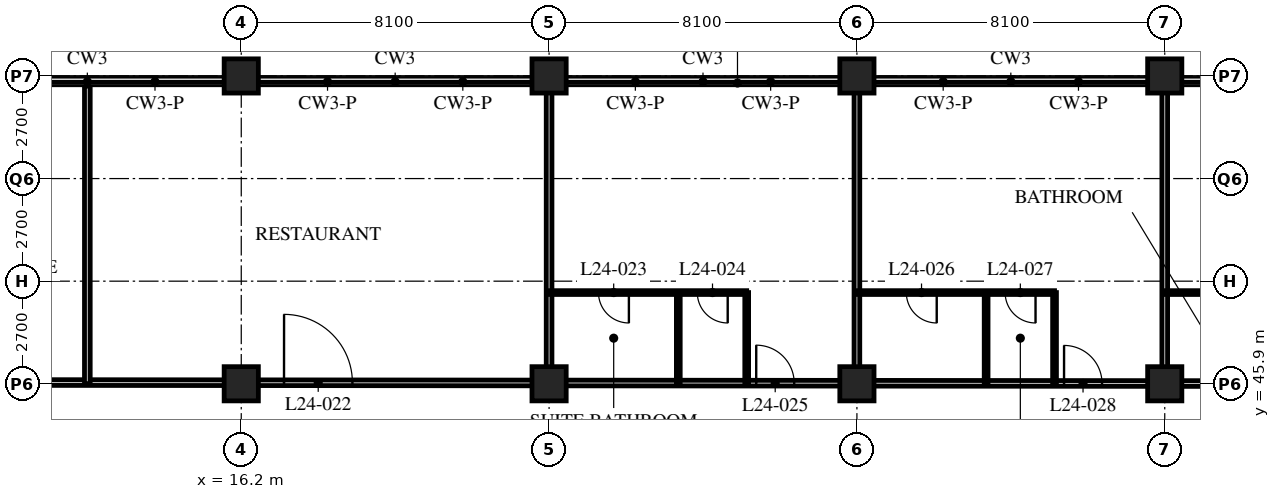
"""IFC4 building model, lengths in metres.
Left out: names, types, materials, properties, quantities, classifications, styles, units other than length and angle.
Written with IfcOpenShell. Run it as: python <this file> out.ifc"""

import sys

from ifc_helpers import new_model, si_unit, direction, frame, frame_2d, origin, origin_2d, place, context, subcontext, project, spatial, rectangle, hollow_rectangle, extrude, element, fill, save


model = new_model("IFC4")
c1 = context("Model", 3, precision=1e-05, world=origin(), true_north=direction((0.0, 1.0)))
c2 = subcontext(c1, "Body", "Model", "MODEL_VIEW")
j1 = project(units=[si_unit("LENGTHUNIT", "METRE"), si_unit("PLANEANGLEUNIT", "RADIAN")], contexts=[c1])
p1 = place(None, origin())
s1 = spatial("IfcSite", under=j1, at=p1, CompositionType="ELEMENT")
p2 = place(p1, origin())
s2 = spatial("IfcBuilding", under=s1, at=p2, CompositionType="ELEMENT")
p3 = place(p2, frame((0.0, 0.0, 98.0)))
s3 = spatial("IfcBuildingStorey", under=s2, at=p3, CompositionType="ELEMENT", Elevation=98.0)
p4 = place(p3, frame((16.2, 45.9, 0.0), z_axis=(0.0, 0.0, 1.0), x_axis=(1.0, 0.0, 0.0)))
e1 = element("IfcColumn", 1, at=p4, inside=s3, PredefinedType="COLUMN", context=c2, shape_type="SweptSolid", body=[
    extrude(hollow_rectangle(XDim=0.9, YDim=0.9, WallThickness=0.1, at=origin_2d()), origin(), (0.0, 0.0, 1.0), 5.4),
])
p5 = place(p3, frame((16.2, 54.0, 0.0), z_axis=(0.0, 0.0, 1.0), x_axis=(1.0, 0.0, 0.0)))
e2 = element("IfcColumn", 2, at=p5, inside=s3, PredefinedType="COLUMN", context=c2, shape_type="SweptSolid", body=[
    extrude(hollow_rectangle(XDim=0.9, YDim=0.9, WallThickness=0.09, at=origin_2d()), origin(), (0.0, 0.0, 1.0), 5.4),
])
p6 = place(p3, frame((24.3, 45.9, 0.0), z_axis=(0.0, 0.0, 1.0), x_axis=(1.0, 0.0, 0.0)))
e3 = element("IfcColumn", 3, at=p6, inside=s3, PredefinedType="COLUMN", context=c2, shape_type="SweptSolid", body=[
    extrude(hollow_rectangle(XDim=0.9, YDim=0.9, WallThickness=0.1, at=origin_2d()), origin(), (0.0, 0.0, 1.0), 5.4),
])
p7 = place(p3, frame((24.3, 54.0, 0.0), z_axis=(0.0, 0.0, 1.0), x_axis=(1.0, 0.0, 0.0)))
e4 = element("IfcColumn", 4, at=p7, inside=s3, PredefinedType="COLUMN", context=c2, shape_type="SweptSolid", body=[
    extrude(hollow_rectangle(XDim=0.9, YDim=0.9, WallThickness=0.09, at=origin_2d()), origin(), (0.0, 0.0, 1.0), 5.4),
])
p8 = place(p3, frame((32.4, 45.9, 0.0), z_axis=(0.0, 0.0, 1.0), x_axis=(1.0, 0.0, 0.0)))
e5 = element("IfcColumn", 5, at=p8, inside=s3, PredefinedType="COLUMN", context=c2, shape_type="SweptSolid", body=[
    extrude(hollow_rectangle(XDim=0.9, YDim=0.9, WallThickness=0.1, at=origin_2d()), origin(), (0.0, 0.0, 1.0), 5.4),
])
p9 = place(p3, frame((32.4, 54.0, 0.0), z_axis=(0.0, 0.0, 1.0), x_axis=(1.0, 0.0, 0.0)))
e6 = element("IfcColumn", 6, at=p9, inside=s3, PredefinedType="COLUMN", context=c2, shape_type="SweptSolid", body=[
    extrude(hollow_rectangle(XDim=0.9, YDim=0.9, WallThickness=0.09, at=origin_2d()), origin(), (0.0, 0.0, 1.0), 5.4),
])
p10 = place(p3, frame((40.5, 45.9, 0.0), z_axis=(0.0, 0.0, 1.0), x_axis=(1.0, 0.0, 0.0)))
e7 = element("IfcColumn", 7, at=p10, inside=s3, PredefinedType="COLUMN", context=c2, shape_type="SweptSolid", body=[
    extrude(hollow_rectangle(XDim=0.9, YDim=0.9, WallThickness=0.1, at=origin_2d()), origin(), (0.0, 0.0, 1.0), 5.4),
])
p11 = place(p3, frame((40.5, 54.0, 0.0), z_axis=(0.0, 0.0, 1.0), x_axis=(1.0, 0.0, 0.0)))
e8 = element("IfcColumn", 8, at=p11, inside=s3, PredefinedType="COLUMN", context=c2, shape_type="SweptSolid", body=[
    extrude(hollow_rectangle(XDim=0.9, YDim=0.9, WallThickness=0.09, at=origin_2d()), origin(), (0.0, 0.0, 1.0), 5.4),
])
p12 = place(p3, frame((8.1, 45.935, 0.0), z_axis=(0.0, 0.0, 1.0), x_axis=(0.99999962324, -0.000868055229, 0.0)))
e9 = element("IfcWall", 9, at=p12, inside=s3, PredefinedType="PARTITIONING", context=c2, shape_type="SweptSolid", body=[
    extrude(rectangle(XDim=40.5, YDim=0.15, at=frame_2d((20.25, 0.0))), origin(), (0.0, 0.0, 1.0), 4.49),
])
p13 = place(p12, frame((9.225, 0.0, 0.0)))
e10 = element("IfcOpeningElement", 10, at=p13, cuts=e9, PredefinedType="OPENING", context=c2, shape_type="SweptSolid", body=[
    extrude(rectangle(XDim=1.8, YDim=2.4, at=frame_2d((0.9, 1.2))), frame((0.0, 0.085, 0.0), z_axis=(0.0, -1.0, 0.0), x_axis=(1.0, 0.0, 0.0)), (0.0, 0.0, 1.0), 0.17),
])
p14 = place(p12, frame((21.65, 0.0, 0.0)))
e11 = element("IfcOpeningElement", 11, at=p14, cuts=e9, PredefinedType="OPENING", context=c2, shape_type="SweptSolid", body=[
    extrude(rectangle(XDim=1.0, YDim=2.1, at=frame_2d((0.5, 1.05))), frame((0.0, 0.085, 0.0), z_axis=(0.0, -1.0, 0.0), x_axis=(1.0, 0.0, 0.0)), (0.0, 0.0, 1.0), 0.17),
])
p15 = place(p12, frame((29.75, 0.0, 0.0)))
e12 = element("IfcOpeningElement", 12, at=p15, cuts=e9, PredefinedType="OPENING", context=c2, shape_type="SweptSolid", body=[
    extrude(rectangle(XDim=1.0, YDim=2.1, at=frame_2d((0.5, 1.05))), frame((0.0, 0.085, 0.0), z_axis=(0.0, -1.0, 0.0), x_axis=(1.0, 0.0, 0.0)), (0.0, 0.0, 1.0), 0.17),
])
p16 = place(p12, frame((34.85, 0.0, 0.0)))
e13 = element("IfcOpeningElement", 13, at=p16, cuts=e9, PredefinedType="OPENING", context=c2, shape_type="SweptSolid", body=[
    extrude(rectangle(XDim=1.0, YDim=2.1, at=frame_2d((0.5, 1.05))), frame((0.0, 0.085, 0.0), z_axis=(0.0, -1.0, 0.0), x_axis=(1.0, 0.0, 0.0)), (0.0, 0.0, 1.0), 0.17),
])
p17 = place(p12, frame((37.975, 0.0, 0.0)))
e14 = element("IfcOpeningElement", 14, at=p17, cuts=e9, PredefinedType="OPENING", context=c2, shape_type="SweptSolid", body=[
    extrude(rectangle(XDim=1.0, YDim=2.1, at=frame_2d((0.5, 1.05))), frame((0.0, 0.085, 0.0), z_axis=(0.0, -1.0, 0.0), x_axis=(1.0, 0.0, 0.0)), (0.0, 0.0, 1.0), 0.17),
])
p18 = place(p12, frame((1.525, 0.0, 0.0)))
e15 = element("IfcOpeningElement", 15, at=p18, cuts=e9, PredefinedType="OPENING", context=c2, shape_type="SweptSolid", body=[
    extrude(rectangle(XDim=1.0, YDim=2.1, at=frame_2d((0.5, 1.05))), frame((0.0, 0.085, 0.0), z_axis=(0.0, -1.0, 0.0), x_axis=(1.0, 0.0, 0.0)), (0.0, 0.0, 1.0), 0.17),
])
p19 = place(p3, frame((24.3, 45.9, 0.0), z_axis=(0.0, 0.0, 1.0), x_axis=(0.0, 1.0, 0.0)))
e16 = element("IfcWall", 16, at=p19, inside=s3, PredefinedType="PARTITIONING", context=c2, shape_type="SweptSolid", body=[
    extrude(rectangle(XDim=7.8, YDim=0.15, at=frame_2d((3.9, 0.0))), origin(), (0.0, 0.0, 1.0), 4.49),
])
p20 = place(p3, frame((24.3, 48.3, 0.0), z_axis=(0.0, 0.0, 1.0), x_axis=(1.0, 0.0, 0.0)))
e17 = element("IfcWall", 17, at=p20, inside=s3, PredefinedType="PARTITIONING", context=c2, shape_type="SweptSolid", body=[
    extrude(rectangle(XDim=5.2, YDim=0.1, at=frame_2d((2.6, 0.0))), origin(), (0.0, 0.0, 1.0), 5.19),
])
p21 = place(p20, frame((1.3, 0.0, 0.0)))
e18 = element("IfcOpeningElement", 18, at=p21, cuts=e17, PredefinedType="OPENING", context=c2, shape_type="SweptSolid", body=[
    extrude(rectangle(XDim=0.8, YDim=2.1, at=frame_2d((0.4, 1.05))), frame((0.0, 0.06, 0.0), z_axis=(0.0, -1.0, 0.0), x_axis=(1.0, 0.0, 0.0)), (0.0, 0.0, 1.0), 0.12),
])
p22 = place(p20, frame((3.9, 0.0, 0.0)))
e19 = element("IfcOpeningElement", 19, at=p22, cuts=e17, PredefinedType="OPENING", context=c2, shape_type="SweptSolid", body=[
    extrude(rectangle(XDim=0.8, YDim=2.1, at=frame_2d((0.4, 1.05))), frame((0.0, 0.06, 0.0), z_axis=(0.0, -1.0, 0.0), x_axis=(1.0, 0.0, 0.0)), (0.0, 0.0, 1.0), 0.12),
])
for number, where, z_axis, x_axis in (
    (20, (27.7, 45.9, 0.0), (0.0, 0.0, 1.0), (0.0, 1.0, 0.0)),
    (21, (29.5, 45.9, 0.0), (0.0, 0.0, 1.0), (0.0, 1.0, 0.0)),
):
    element("IfcWall", number, at=place(p3, frame(where, z_axis=z_axis, x_axis=x_axis)), inside=s3, PredefinedType="PARTITIONING", context=c2, shape_type="SweptSolid", body=[
        extrude(rectangle(XDim=2.4, YDim=0.1, at=frame_2d((1.2, 0.0))), origin(), (0.0, 0.0, 1.0), 5.19),
    ])
p23 = place(p3, frame((32.4, 45.9, 0.0), z_axis=(0.0, 0.0, 1.0), x_axis=(0.0, 1.0, 0.0)))
e22 = element("IfcWall", 22, at=p23, inside=s3, PredefinedType="PARTITIONING", context=c2, shape_type="SweptSolid", body=[
    extrude(rectangle(XDim=7.8, YDim=0.15, at=frame_2d((3.9, 0.0))), origin(), (0.0, 0.0, 1.0), 4.49),
])
p24 = place(p3, frame((32.4, 48.3, 0.0), z_axis=(0.0, 0.0, 1.0), x_axis=(1.0, 0.0, 0.0)))
e23 = element("IfcWall", 23, at=p24, inside=s3, PredefinedType="PARTITIONING", context=c2, shape_type="SweptSolid", body=[
    extrude(rectangle(XDim=5.2, YDim=0.1, at=frame_2d((2.6, 0.0))), origin(), (0.0, 0.0, 1.0), 5.19),
])
p25 = place(p24, frame((1.3, 0.0, 0.0)))
e24 = element("IfcOpeningElement", 24, at=p25, cuts=e23, PredefinedType="OPENING", context=c2, shape_type="SweptSolid", body=[
    extrude(rectangle(XDim=0.8, YDim=2.1, at=frame_2d((0.4, 1.05))), frame((0.0, 0.06, 0.0), z_axis=(0.0, -1.0, 0.0), x_axis=(1.0, 0.0, 0.0)), (0.0, 0.0, 1.0), 0.12),
])
p26 = place(p24, frame((3.9, 0.0, 0.0)))
e25 = element("IfcOpeningElement", 25, at=p26, cuts=e23, PredefinedType="OPENING", context=c2, shape_type="SweptSolid", body=[
    extrude(rectangle(XDim=0.8, YDim=2.1, at=frame_2d((0.4, 1.05))), frame((0.0, 0.06, 0.0), z_axis=(0.0, -1.0, 0.0), x_axis=(1.0, 0.0, 0.0)), (0.0, 0.0, 1.0), 0.12),
])
for number, where, z_axis, x_axis in (
    (26, (35.8, 45.9, 0.0), (0.0, 0.0, 1.0), (0.0, 1.0, 0.0)),
    (27, (37.6, 45.9, 0.0), (0.0, 0.0, 1.0), (0.0, 1.0, 0.0)),
):
    element("IfcWall", number, at=place(p3, frame(where, z_axis=z_axis, x_axis=x_axis)), inside=s3, PredefinedType="PARTITIONING", context=c2, shape_type="SweptSolid", body=[
        extrude(rectangle(XDim=2.4, YDim=0.1, at=frame_2d((1.2, 0.0))), origin(), (0.0, 0.0, 1.0), 5.19),
    ])
p27 = place(p3, frame((40.5, 45.9, 0.0), z_axis=(0.0, 0.0, 1.0), x_axis=(0.0, 1.0, 0.0)))
e28 = element("IfcWall", 28, at=p27, inside=s3, PredefinedType="PARTITIONING", context=c2, shape_type="SweptSolid", body=[
    extrude(rectangle(XDim=7.8, YDim=0.15, at=frame_2d((3.9, 0.0))), origin(), (0.0, 0.0, 1.0), 4.49),
])
p28 = place(p3, frame((40.5, 48.3, 0.0), z_axis=(0.0, 0.0, 1.0), x_axis=(1.0, 0.0, 0.0)))
e29 = element("IfcWall", 29, at=p28, inside=s3, PredefinedType="PARTITIONING", context=c2, shape_type="SweptSolid", body=[
    extrude(rectangle(XDim=2.3, YDim=0.1, at=frame_2d((1.15, 0.0))), origin(), (0.0, 0.0, 1.0), 5.19),
])
p29 = place(p3, frame((12.15, 45.9, 0.0), z_axis=(0.0, 0.0, 1.0), x_axis=(0.0, 1.0, 0.0)))
e30 = element("IfcWall", 30, at=p29, inside=s3, PredefinedType="PARTITIONING", context=c2, shape_type="SweptSolid", body=[
    extrude(rectangle(XDim=7.835, YDim=0.15, at=frame_2d((3.917, 0.0))), origin(), (0.0, 0.0, 1.0), 5.19),
])
p30 = place(p13, origin())
e31 = element("IfcDoor", 31, at=p30, inside=s3, OperationType="DOUBLE_DOOR_SINGLE_SWING", PredefinedType="DOOR", context=c2, shape_type="SweptSolid", body=[
    extrude(rectangle(XDim=1.8, YDim=2.4, at=frame_2d((0.9, 1.2))), frame((0.0, 0.025, 0.0), z_axis=(0.0, -1.0, 0.0), x_axis=(1.0, 0.0, 0.0)), (0.0, 0.0, 1.0), 0.05),
])
fill(e10, e31)
p31 = place(p21, origin())
e32 = element("IfcDoor", 32, at=p31, inside=s3, OperationType="SINGLE_SWING_LEFT", PredefinedType="DOOR", context=c2, shape_type="SweptSolid", body=[
    extrude(rectangle(XDim=0.8, YDim=2.1, at=frame_2d((0.4, 1.05))), frame((0.0, 0.025, 0.0), z_axis=(0.0, -1.0, 0.0), x_axis=(1.0, 0.0, 0.0)), (0.0, 0.0, 1.0), 0.05),
])
fill(e18, e32)
p32 = place(p22, origin())
e33 = element("IfcDoor", 33, at=p32, inside=s3, OperationType="SINGLE_SWING_LEFT", PredefinedType="DOOR", context=c2, shape_type="SweptSolid", body=[
    extrude(rectangle(XDim=0.8, YDim=2.1, at=frame_2d((0.4, 1.05))), frame((0.0, 0.025, 0.0), z_axis=(0.0, -1.0, 0.0), x_axis=(1.0, 0.0, 0.0)), (0.0, 0.0, 1.0), 0.05),
])
fill(e19, e33)
p33 = place(p14, origin())
e34 = element("IfcDoor", 34, at=p33, inside=s3, OperationType="SINGLE_SWING_LEFT", PredefinedType="DOOR", context=c2, shape_type="SweptSolid", body=[
    extrude(rectangle(XDim=1.0, YDim=2.1, at=frame_2d((0.5, 1.05))), frame((0.0, 0.025, 0.0), z_axis=(0.0, -1.0, 0.0), x_axis=(1.0, 0.0, 0.0)), (0.0, 0.0, 1.0), 0.05),
])
fill(e11, e34)
p34 = place(p25, origin())
e35 = element("IfcDoor", 35, at=p34, inside=s3, OperationType="SINGLE_SWING_LEFT", PredefinedType="DOOR", context=c2, shape_type="SweptSolid", body=[
    extrude(rectangle(XDim=0.8, YDim=2.1, at=frame_2d((0.4, 1.05))), frame((0.0, 0.025, 0.0), z_axis=(0.0, -1.0, 0.0), x_axis=(1.0, 0.0, 0.0)), (0.0, 0.0, 1.0), 0.05),
])
fill(e24, e35)
p35 = place(p26, origin())
e36 = element("IfcDoor", 36, at=p35, inside=s3, OperationType="SINGLE_SWING_LEFT", PredefinedType="DOOR", context=c2, shape_type="SweptSolid", body=[
    extrude(rectangle(XDim=0.8, YDim=2.1, at=frame_2d((0.4, 1.05))), frame((0.0, 0.025, 0.0), z_axis=(0.0, -1.0, 0.0), x_axis=(1.0, 0.0, 0.0)), (0.0, 0.0, 1.0), 0.05),
])
fill(e25, e36)
p36 = place(p15, origin())
e37 = element("IfcDoor", 37, at=p36, inside=s3, OperationType="SINGLE_SWING_LEFT", PredefinedType="DOOR", context=c2, shape_type="SweptSolid", body=[
    extrude(rectangle(XDim=1.0, YDim=2.1, at=frame_2d((0.5, 1.05))), frame((0.0, 0.025, 0.0), z_axis=(0.0, -1.0, 0.0), x_axis=(1.0, 0.0, 0.0)), (0.0, 0.0, 1.0), 0.05),
])
fill(e12, e37)
save(model, sys.argv[1])
